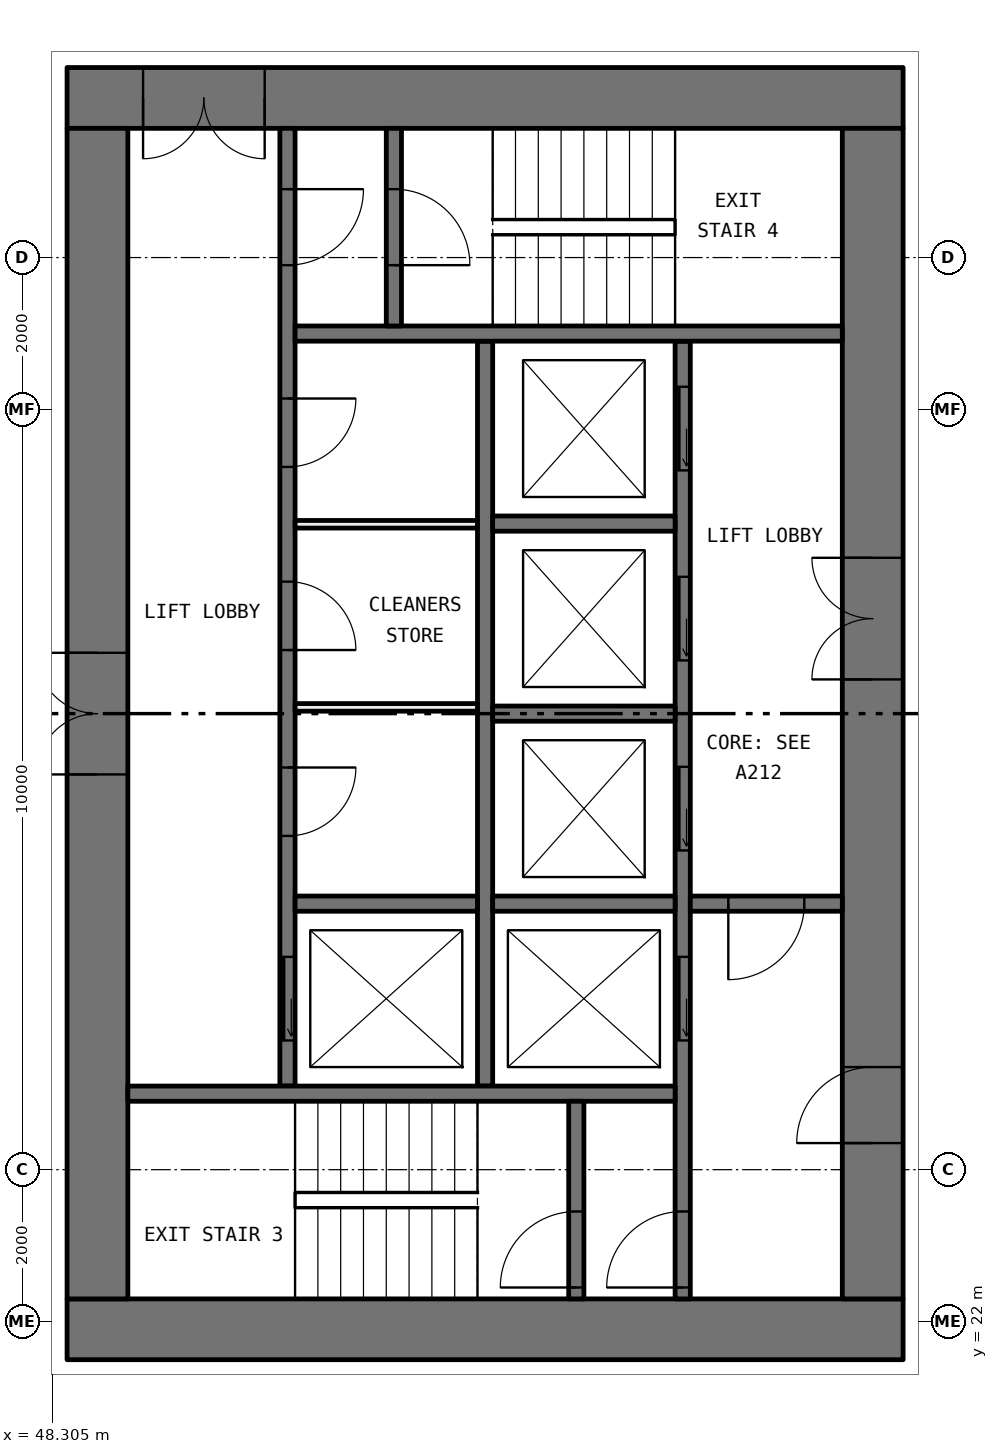
"""IFC4 building model, lengths in metres.
Left out: names, types, materials, properties, quantities, classifications, styles, units other than length and angle.
Written with IfcOpenShell. Run it as: python <this file> out.ifc"""

import sys

from ifc_helpers import new_model, si_unit, direction, frame, frame_2d, origin, place, context, subcontext, project, spatial, rectangle, extrude, element, fill, save


model = new_model("IFC4")
c1 = context("Model", 3, precision=1e-05, world=origin(), true_north=direction((0.0, 1.0)))
c2 = subcontext(c1, "Body", "Model", "MODEL_VIEW")
j1 = project(units=[si_unit("LENGTHUNIT", "METRE"), si_unit("PLANEANGLEUNIT", "RADIAN")], contexts=[c1])
p1 = place(None, origin())
s1 = spatial("IfcSite", under=j1, at=p1, CompositionType="ELEMENT")
p2 = place(p1, origin())
s2 = spatial("IfcBuilding", under=s1, at=p2, CompositionType="ELEMENT")
p3 = place(p2, frame((0.0, 0.0, 50.7)))
s3 = spatial("IfcBuildingStorey", under=s2, at=p3, CompositionType="ELEMENT", Elevation=50.7)
p4 = place(p3, frame((59.5, 21.9, 0.0), z_axis=(0.0, 0.0, 1.0), x_axis=(-1.0, 0.0, 0.0)))
e1 = element("IfcWall", 1, at=p4, inside=s3, PredefinedType="SHEAR", context=c2, shape_type="SweptSolid", body=[
    extrude(rectangle(XDim=11.0, YDim=0.8, at=frame_2d((5.5, 0.0))), origin(), (0.0, 0.0, 1.0), 3.05),
])
p5 = place(p3, frame((59.5, 38.1, 0.0), z_axis=(0.0, 0.0, 1.0), x_axis=(-1.0, 0.0, 0.0)))
e2 = element("IfcWall", 2, at=p5, inside=s3, PredefinedType="SHEAR", context=c2, shape_type="SweptSolid", body=[
    extrude(rectangle(XDim=11.0, YDim=0.8, at=frame_2d((5.5, 0.0))), origin(), (0.0, 0.0, 1.0), 3.05),
])
p6 = place(p5, frame((8.4, 0.0, 0.0)))
e3 = element("IfcOpeningElement", 3, at=p6, cuts=e2, PredefinedType="OPENING", context=c2, shape_type="SweptSolid", body=[
    extrude(rectangle(XDim=1.6, YDim=2.1, at=frame_2d((0.8, 1.05))), frame((0.0, 0.41, 0.0), z_axis=(0.0, -1.0, 0.0), x_axis=(1.0, 0.0, 0.0)), (0.0, 0.0, 1.0), 0.82),
])
p7 = place(p3, frame((59.1, 22.3, 0.0), z_axis=(0.0, 0.0, 1.0), x_axis=(0.0, 1.0, 0.0)))
e4 = element("IfcWall", 4, at=p7, inside=s3, PredefinedType="SHEAR", context=c2, shape_type="SweptSolid", body=[
    extrude(rectangle(XDim=15.4, YDim=0.8, at=frame_2d((7.7, 0.0))), origin(), (0.0, 0.0, 1.0), 3.05),
])
p8 = place(p7, frame((8.15, 0.0, 0.0)))
e5 = element("IfcOpeningElement", 5, at=p8, cuts=e4, PredefinedType="OPENING", context=c2, shape_type="SweptSolid", body=[
    extrude(rectangle(XDim=1.6, YDim=2.1, at=frame_2d((0.8, 1.05))), frame((0.0, 0.41, 0.0), z_axis=(0.0, -1.0, 0.0), x_axis=(1.0, 0.0, 0.0)), (0.0, 0.0, 1.0), 0.82),
])
p9 = place(p7, frame((2.05, 0.0, 0.0)))
e6 = element("IfcOpeningElement", 6, at=p9, cuts=e4, PredefinedType="OPENING", context=c2, shape_type="SweptSolid", body=[
    extrude(rectangle(XDim=1.0, YDim=2.1, at=frame_2d((0.5, 1.05))), frame((0.0, 0.41, 0.0), z_axis=(0.0, -1.0, 0.0), x_axis=(1.0, 0.0, 0.0)), (0.0, 0.0, 1.0), 0.82),
])
p10 = place(p3, frame((48.9, 22.3, 0.0), z_axis=(0.0, 0.0, 1.0), x_axis=(0.0, 1.0, 0.0)))
e7 = element("IfcWall", 7, at=p10, inside=s3, PredefinedType="SHEAR", context=c2, shape_type="SweptSolid", body=[
    extrude(rectangle(XDim=15.4, YDim=0.8, at=frame_2d((7.7, 0.0))), origin(), (0.0, 0.0, 1.0), 3.05),
])
p11 = place(p10, frame((6.9, 0.0, 0.0)))
e8 = element("IfcOpeningElement", 8, at=p11, cuts=e7, PredefinedType="OPENING", context=c2, shape_type="SweptSolid", body=[
    extrude(rectangle(XDim=1.6, YDim=2.1, at=frame_2d((0.8, 1.05))), frame((0.0, 0.41, 0.0), z_axis=(0.0, -1.0, 0.0), x_axis=(1.0, 0.0, 0.0)), (0.0, 0.0, 1.0), 0.82),
])
p12 = place(p3, frame((56.6, 22.3, 0.0), z_axis=(0.0, 0.0, 1.0), x_axis=(0.0, 1.0, 0.0)))
e9 = element("IfcWall", 9, at=p12, inside=s3, PredefinedType="SOLIDWALL", context=c2, shape_type="SweptSolid", body=[
    extrude(rectangle(XDim=12.6, YDim=0.2, at=frame_2d((6.3, 0.0))), origin(), (0.0, 0.0, 1.0), 3.05),
])
p13 = place(p12, frame((3.4, 0.0, 0.0)))
e10 = element("IfcOpeningElement", 10, at=p13, cuts=e9, PredefinedType="OPENING", context=c2, shape_type="SweptSolid", body=[
    extrude(rectangle(XDim=1.1, YDim=2.1, at=frame_2d((0.55, 1.05))), frame((0.0, 0.11, 0.0), z_axis=(0.0, -1.0, 0.0), x_axis=(1.0, 0.0, 0.0)), (0.0, 0.0, 1.0), 0.22),
])
p14 = place(p12, frame((5.9, 0.0, 0.0)))
e11 = element("IfcOpeningElement", 11, at=p14, cuts=e9, PredefinedType="OPENING", context=c2, shape_type="SweptSolid", body=[
    extrude(rectangle(XDim=1.1, YDim=2.1, at=frame_2d((0.55, 1.05))), frame((0.0, 0.11, 0.0), z_axis=(0.0, -1.0, 0.0), x_axis=(1.0, 0.0, 0.0)), (0.0, 0.0, 1.0), 0.22),
])
p15 = place(p12, frame((8.4, 0.0, 0.0)))
e12 = element("IfcOpeningElement", 12, at=p15, cuts=e9, PredefinedType="OPENING", context=c2, shape_type="SweptSolid", body=[
    extrude(rectangle(XDim=1.1, YDim=2.1, at=frame_2d((0.55, 1.05))), frame((0.0, 0.11, 0.0), z_axis=(0.0, -1.0, 0.0), x_axis=(1.0, 0.0, 0.0)), (0.0, 0.0, 1.0), 0.22),
])
p16 = place(p12, frame((10.9, 0.0, 0.0)))
e13 = element("IfcOpeningElement", 13, at=p16, cuts=e9, PredefinedType="OPENING", context=c2, shape_type="SweptSolid", body=[
    extrude(rectangle(XDim=1.1, YDim=2.1, at=frame_2d((0.55, 1.05))), frame((0.0, 0.11, 0.0), z_axis=(0.0, -1.0, 0.0), x_axis=(1.0, 0.0, 0.0)), (0.0, 0.0, 1.0), 0.22),
])
p17 = place(p12, frame((0.15, 0.0, 0.0)))
e14 = element("IfcOpeningElement", 14, at=p17, cuts=e9, PredefinedType="OPENING", context=c2, shape_type="SweptSolid", body=[
    extrude(rectangle(XDim=1.0, YDim=2.1, at=frame_2d((0.5, 1.05))), frame((0.0, 0.11, 0.0), z_axis=(0.0, -1.0, 0.0), x_axis=(1.0, 0.0, 0.0)), (0.0, 0.0, 1.0), 0.22),
])
p18 = place(p3, frame((51.4, 25.1, 0.0), z_axis=(0.0, 0.0, 1.0), x_axis=(0.0, 1.0, 0.0)))
e15 = element("IfcWall", 15, at=p18, inside=s3, PredefinedType="SOLIDWALL", context=c2, shape_type="SweptSolid", body=[
    extrude(rectangle(XDim=12.6, YDim=0.2, at=frame_2d((6.3, 0.0))), origin(), (0.0, 0.0, 1.0), 3.05),
])
p19 = place(p18, frame((0.6, 0.0, 0.0)))
e16 = element("IfcOpeningElement", 16, at=p19, cuts=e15, PredefinedType="OPENING", context=c2, shape_type="SweptSolid", body=[
    extrude(rectangle(XDim=1.1, YDim=2.1, at=frame_2d((0.55, 1.05))), frame((0.0, 0.11, 0.0), z_axis=(0.0, -1.0, 0.0), x_axis=(1.0, 0.0, 0.0)), (0.0, 0.0, 1.0), 0.22),
])
p20 = place(p18, frame((10.8, 0.0, 0.0)))
e17 = element("IfcOpeningElement", 17, at=p20, cuts=e15, PredefinedType="OPENING", context=c2, shape_type="SweptSolid", body=[
    extrude(rectangle(XDim=1.0, YDim=2.1, at=frame_2d((0.5, 1.05))), frame((0.0, 0.11, 0.0), z_axis=(0.0, -1.0, 0.0), x_axis=(1.0, 0.0, 0.0)), (0.0, 0.0, 1.0), 0.22),
])
p21 = place(p18, frame((3.291, 0.0, 0.0)))
e18 = element("IfcOpeningElement", 18, at=p21, cuts=e15, PredefinedType="OPENING", context=c2, shape_type="SweptSolid", body=[
    extrude(rectangle(XDim=0.9, YDim=2.1, at=frame_2d((0.45, 1.05))), frame((0.0, 0.11, 0.0), z_axis=(0.0, -1.0, 0.0), x_axis=(1.0, 0.0, 0.0)), (0.0, 0.0, 1.0), 0.22),
])
p22 = place(p18, frame((5.737, 0.0, 0.0)))
e19 = element("IfcOpeningElement", 19, at=p22, cuts=e15, PredefinedType="OPENING", context=c2, shape_type="SweptSolid", body=[
    extrude(rectangle(XDim=0.9, YDim=2.1, at=frame_2d((0.45, 1.05))), frame((0.0, 0.11, 0.0), z_axis=(0.0, -1.0, 0.0), x_axis=(1.0, 0.0, 0.0)), (0.0, 0.0, 1.0), 0.22),
])
p23 = place(p18, frame((8.146, 0.0, 0.0)))
e20 = element("IfcOpeningElement", 20, at=p23, cuts=e15, PredefinedType="OPENING", context=c2, shape_type="SweptSolid", body=[
    extrude(rectangle(XDim=0.9, YDim=2.1, at=frame_2d((0.45, 1.05))), frame((0.0, 0.11, 0.0), z_axis=(0.0, -1.0, 0.0), x_axis=(1.0, 0.0, 0.0)), (0.0, 0.0, 1.0), 0.22),
])
p24 = place(p3, frame((54.0, 25.1, 0.0), z_axis=(0.0, 0.0, 1.0), x_axis=(0.0, 1.0, 0.0)))
e21 = element("IfcWall", 21, at=p24, inside=s3, PredefinedType="SOLIDWALL", context=c2, shape_type="SweptSolid", body=[
    extrude(rectangle(XDim=9.8, YDim=0.2, at=frame_2d((4.9, 0.0))), origin(), (0.0, 0.0, 1.0), 3.05),
])
for number, where, z_axis, x_axis in (
    (22, (56.5, 25.0, 0.0), (0.0, 0.0, 1.0), (-1.0, 0.0, 0.0)),
    (23, (58.7, 35.0, 0.0), (0.0, 0.0, 1.0), (-1.0, 0.0, 0.0)),
):
    element("IfcWall", number, at=place(p3, frame(where, z_axis=z_axis, x_axis=x_axis)), inside=s3, PredefinedType="SOLIDWALL", context=c2, shape_type="SweptSolid", body=[
        extrude(rectangle(XDim=7.2, YDim=0.2, at=frame_2d((3.6, 0.0))), origin(), (0.0, 0.0, 1.0), 3.05),
    ])
p25 = place(p3, frame((58.7, 27.5, 0.0), z_axis=(0.0, 0.0, 1.0), x_axis=(-1.0, 0.0, 0.0)))
e24 = element("IfcWall", 24, at=p25, inside=s3, PredefinedType="SOLIDWALL", context=c2, shape_type="SweptSolid", body=[
    extrude(rectangle(XDim=2.0, YDim=0.2, at=frame_2d((1.0, 0.0))), origin(), (0.0, 0.0, 1.0), 3.05),
])
p26 = place(p25, frame((0.5, 0.0, 0.0)))
e25 = element("IfcOpeningElement", 25, at=p26, cuts=e24, PredefinedType="OPENING", context=c2, shape_type="SweptSolid", body=[
    extrude(rectangle(XDim=1.0, YDim=2.1, at=frame_2d((0.5, 1.05))), frame((0.0, 0.11, 0.0), z_axis=(0.0, -1.0, 0.0), x_axis=(1.0, 0.0, 0.0)), (0.0, 0.0, 1.0), 0.22),
])
p27 = place(p3, frame((55.2, 22.3, 0.0), z_axis=(0.0, 0.0, 1.0), x_axis=(0.0, 1.0, 0.0)))
e26 = element("IfcWall", 26, at=p27, inside=s3, PredefinedType="SOLIDWALL", context=c2, shape_type="SweptSolid", body=[
    extrude(rectangle(XDim=2.6, YDim=0.2, at=frame_2d((1.3, 0.0))), origin(), (0.0, 0.0, 1.0), 3.05),
])
p28 = place(p27, frame((0.15, 0.0, 0.0)))
e27 = element("IfcOpeningElement", 27, at=p28, cuts=e26, PredefinedType="OPENING", context=c2, shape_type="SweptSolid", body=[
    extrude(rectangle(XDim=1.0, YDim=2.1, at=frame_2d((0.5, 1.05))), frame((0.0, 0.11, 0.0), z_axis=(0.0, -1.0, 0.0), x_axis=(1.0, 0.0, 0.0)), (0.0, 0.0, 1.0), 0.22),
])
p29 = place(p3, frame((52.8, 35.1, 0.0), z_axis=(0.0, 0.0, 1.0), x_axis=(0.0, 1.0, 0.0)))
e28 = element("IfcWall", 28, at=p29, inside=s3, PredefinedType="SOLIDWALL", context=c2, shape_type="SweptSolid", body=[
    extrude(rectangle(XDim=2.6, YDim=0.2, at=frame_2d((1.3, 0.0))), origin(), (0.0, 0.0, 1.0), 3.05),
])
p30 = place(p29, frame((0.8, 0.0, 0.0)))
e29 = element("IfcOpeningElement", 29, at=p30, cuts=e28, PredefinedType="OPENING", context=c2, shape_type="SweptSolid", body=[
    extrude(rectangle(XDim=1.0, YDim=2.1, at=frame_2d((0.5, 1.05))), frame((0.0, 0.11, 0.0), z_axis=(0.0, -1.0, 0.0), x_axis=(1.0, 0.0, 0.0)), (0.0, 0.0, 1.0), 0.22),
])
for number, where, z_axis, x_axis in (
    (30, (56.5, 27.5, 0.0), (0.0, 0.0, 1.0), (-1.0, 0.0, 0.0)),
    (31, (56.5, 30.0, 0.0), (0.0, 0.0, 1.0), (-1.0, 0.0, 0.0)),
    (32, (56.5, 32.5, 0.0), (0.0, 0.0, 1.0), (-1.0, 0.0, 0.0)),
    (33, (53.9, 27.5, 0.0), (0.0, 0.0, 1.0), (-1.0, 0.0, 0.0)),
):
    element("IfcWall", number, at=place(p3, frame(where, z_axis=z_axis, x_axis=x_axis)), inside=s3, PredefinedType="SOLIDWALL", context=c2, shape_type="SweptSolid", body=[
        extrude(rectangle(XDim=2.4, YDim=0.2, at=frame_2d((1.2, 0.0))), origin(), (0.0, 0.0, 1.0), 3.05),
    ])
for number, where, z_axis, x_axis in (
    (34, (53.9, 30.082, 0.0), (0.0, 0.0, 1.0), (-1.0, 0.0, 0.0)),
    (35, (53.9, 32.491, 0.0), (0.0, 0.0, 1.0), (-1.0, 0.0, 0.0)),
):
    element("IfcWall", number, at=place(p3, frame(where, z_axis=z_axis, x_axis=x_axis)), inside=s3, PredefinedType="PARTITIONING", context=c2, shape_type="SweptSolid", body=[
        extrude(rectangle(XDim=2.4, YDim=0.1, at=frame_2d((1.2, 0.0))), origin(), (0.0, 0.0, 1.0), 3.05),
    ])
p31 = place(p19, origin())
e36 = element("IfcDoor", 36, at=p31, inside=s3, OperationType="SLIDING_TO_LEFT", PredefinedType="DOOR", context=c2, shape_type="SweptSolid", body=[
    extrude(rectangle(XDim=1.1, YDim=2.1, at=frame_2d((0.55, 1.05))), frame((0.0, 0.025, 0.0), z_axis=(0.0, -1.0, 0.0), x_axis=(1.0, 0.0, 0.0)), (0.0, 0.0, 1.0), 0.05),
])
fill(e16, e36)
p32 = place(p13, origin())
e37 = element("IfcDoor", 37, at=p32, inside=s3, OperationType="SLIDING_TO_LEFT", PredefinedType="DOOR", context=c2, shape_type="SweptSolid", body=[
    extrude(rectangle(XDim=1.1, YDim=2.1, at=frame_2d((0.55, 1.05))), frame((0.0, 0.025, 0.0), z_axis=(0.0, -1.0, 0.0), x_axis=(1.0, 0.0, 0.0)), (0.0, 0.0, 1.0), 0.05),
])
fill(e10, e37)
p33 = place(p14, origin())
e38 = element("IfcDoor", 38, at=p33, inside=s3, OperationType="SLIDING_TO_LEFT", PredefinedType="DOOR", context=c2, shape_type="SweptSolid", body=[
    extrude(rectangle(XDim=1.1, YDim=2.1, at=frame_2d((0.55, 1.05))), frame((0.0, 0.025, 0.0), z_axis=(0.0, -1.0, 0.0), x_axis=(1.0, 0.0, 0.0)), (0.0, 0.0, 1.0), 0.05),
])
fill(e11, e38)
p34 = place(p15, origin())
e39 = element("IfcDoor", 39, at=p34, inside=s3, OperationType="SLIDING_TO_LEFT", PredefinedType="DOOR", context=c2, shape_type="SweptSolid", body=[
    extrude(rectangle(XDim=1.1, YDim=2.1, at=frame_2d((0.55, 1.05))), frame((0.0, 0.025, 0.0), z_axis=(0.0, -1.0, 0.0), x_axis=(1.0, 0.0, 0.0)), (0.0, 0.0, 1.0), 0.05),
])
fill(e12, e39)
p35 = place(p16, origin())
e40 = element("IfcDoor", 40, at=p35, inside=s3, OperationType="SLIDING_TO_LEFT", PredefinedType="DOOR", context=c2, shape_type="SweptSolid", body=[
    extrude(rectangle(XDim=1.1, YDim=2.1, at=frame_2d((0.55, 1.05))), frame((0.0, 0.025, 0.0), z_axis=(0.0, -1.0, 0.0), x_axis=(1.0, 0.0, 0.0)), (0.0, 0.0, 1.0), 0.05),
])
fill(e13, e40)
p36 = place(p28, origin())
e41 = element("IfcDoor", 41, at=p36, inside=s3, OperationType="SINGLE_SWING_RIGHT", PredefinedType="DOOR", context=c2, shape_type="SweptSolid", body=[
    extrude(rectangle(XDim=1.0, YDim=2.1, at=frame_2d((0.5, 1.05))), frame((0.0, 0.025, 0.0), z_axis=(0.0, -1.0, 0.0), x_axis=(1.0, 0.0, 0.0)), (0.0, 0.0, 1.0), 0.05),
])
fill(e27, e41)
p37 = place(p17, origin())
e42 = element("IfcDoor", 42, at=p37, inside=s3, OperationType="SINGLE_SWING_RIGHT", PredefinedType="DOOR", context=c2, shape_type="SweptSolid", body=[
    extrude(rectangle(XDim=1.0, YDim=2.1, at=frame_2d((0.5, 1.05))), frame((0.0, 0.025, 0.0), z_axis=(0.0, -1.0, 0.0), x_axis=(1.0, 0.0, 0.0)), (0.0, 0.0, 1.0), 0.05),
])
fill(e14, e42)
p38 = place(p20, frame((1.0, 0.0, 0.0), x_axis=(-1.0, 0.0, 0.0)))
e43 = element("IfcDoor", 43, at=p38, inside=s3, OperationType="SINGLE_SWING_RIGHT", PredefinedType="DOOR", context=c2, shape_type="SweptSolid", body=[
    extrude(rectangle(XDim=1.0, YDim=2.1, at=frame_2d((0.5, 1.05))), frame((0.0, 0.025, 0.0), z_axis=(0.0, -1.0, 0.0), x_axis=(1.0, 0.0, 0.0)), (0.0, 0.0, 1.0), 0.05),
])
fill(e17, e43)
p39 = place(p30, frame((1.0, 0.0, 0.0), x_axis=(-1.0, 0.0, 0.0)))
e44 = element("IfcDoor", 44, at=p39, inside=s3, OperationType="SINGLE_SWING_LEFT", PredefinedType="DOOR", context=c2, shape_type="SweptSolid", body=[
    extrude(rectangle(XDim=1.0, YDim=2.1, at=frame_2d((0.5, 1.05))), frame((0.0, 0.025, 0.0), z_axis=(0.0, -1.0, 0.0), x_axis=(1.0, 0.0, 0.0)), (0.0, 0.0, 1.0), 0.05),
])
fill(e29, e44)
p40 = place(p26, origin())
e45 = element("IfcDoor", 45, at=p40, inside=s3, OperationType="SINGLE_SWING_LEFT", PredefinedType="DOOR", context=c2, shape_type="SweptSolid", body=[
    extrude(rectangle(XDim=1.0, YDim=2.1, at=frame_2d((0.5, 1.05))), frame((0.0, 0.025, 0.0), z_axis=(0.0, -1.0, 0.0), x_axis=(1.0, 0.0, 0.0)), (0.0, 0.0, 1.0), 0.05),
])
fill(e25, e45)
p41 = place(p8, origin())
e46 = element("IfcDoor", 46, at=p41, inside=s3, OperationType="DOUBLE_DOOR_SINGLE_SWING", PredefinedType="DOOR", context=c2, shape_type="SweptSolid", body=[
    extrude(rectangle(XDim=1.6, YDim=2.1, at=frame_2d((0.8, 1.05))), frame((0.0, 0.025, 0.0), z_axis=(0.0, -1.0, 0.0), x_axis=(1.0, 0.0, 0.0)), (0.0, 0.0, 1.0), 0.05),
])
fill(e5, e46)
p42 = place(p9, origin())
e47 = element("IfcDoor", 47, at=p42, inside=s3, OperationType="SINGLE_SWING_RIGHT", PredefinedType="DOOR", context=c2, shape_type="SweptSolid", body=[
    extrude(rectangle(XDim=1.0, YDim=2.1, at=frame_2d((0.5, 1.05))), frame((0.0, 0.025, 0.0), z_axis=(0.0, -1.0, 0.0), x_axis=(1.0, 0.0, 0.0)), (0.0, 0.0, 1.0), 0.05),
])
fill(e6, e47)
p43 = place(p6, origin())
e48 = element("IfcDoor", 48, at=p43, inside=s3, OperationType="DOUBLE_DOOR_SINGLE_SWING", PredefinedType="DOOR", context=c2, shape_type="SweptSolid", body=[
    extrude(rectangle(XDim=1.6, YDim=2.1, at=frame_2d((0.8, 1.05))), frame((0.0, 0.025, 0.0), z_axis=(0.0, -1.0, 0.0), x_axis=(1.0, 0.0, 0.0)), (0.0, 0.0, 1.0), 0.05),
])
fill(e3, e48)
p44 = place(p11, origin())
e49 = element("IfcDoor", 49, at=p44, inside=s3, OperationType="DOUBLE_DOOR_SINGLE_SWING", PredefinedType="DOOR", context=c2, shape_type="SweptSolid", body=[
    extrude(rectangle(XDim=1.6, YDim=2.1, at=frame_2d((0.8, 1.05))), frame((0.0, 0.025, 0.0), z_axis=(0.0, -1.0, 0.0), x_axis=(1.0, 0.0, 0.0)), (0.0, 0.0, 1.0), 0.05),
])
fill(e8, e49)
p45 = place(p21, frame((0.9, 0.0, 0.0), x_axis=(-1.0, 0.0, 0.0)))
e50 = element("IfcDoor", 50, at=p45, inside=s3, OperationType="SINGLE_SWING_RIGHT", PredefinedType="DOOR", context=c2, shape_type="SweptSolid", body=[
    extrude(rectangle(XDim=0.9, YDim=2.1, at=frame_2d((0.45, 1.05))), frame((0.0, 0.025, 0.0), z_axis=(0.0, -1.0, 0.0), x_axis=(1.0, 0.0, 0.0)), (0.0, 0.0, 1.0), 0.05),
])
fill(e18, e50)
p46 = place(p22, frame((0.9, 0.0, 0.0), x_axis=(-1.0, 0.0, 0.0)))
e51 = element("IfcDoor", 51, at=p46, inside=s3, OperationType="SINGLE_SWING_LEFT", PredefinedType="DOOR", context=c2, shape_type="SweptSolid", body=[
    extrude(rectangle(XDim=0.9, YDim=2.1, at=frame_2d((0.45, 1.05))), frame((0.0, 0.025, 0.0), z_axis=(0.0, -1.0, 0.0), x_axis=(1.0, 0.0, 0.0)), (0.0, 0.0, 1.0), 0.05),
])
fill(e19, e51)
p47 = place(p23, frame((0.9, 0.0, 0.0), x_axis=(-1.0, 0.0, 0.0)))
e52 = element("IfcDoor", 52, at=p47, inside=s3, OperationType="SINGLE_SWING_RIGHT", PredefinedType="DOOR", context=c2, shape_type="SweptSolid", body=[
    extrude(rectangle(XDim=0.9, YDim=2.1, at=frame_2d((0.45, 1.05))), frame((0.0, 0.025, 0.0), z_axis=(0.0, -1.0, 0.0), x_axis=(1.0, 0.0, 0.0)), (0.0, 0.0, 1.0), 0.05),
])
fill(e20, e52)
save(model, sys.argv[1])
